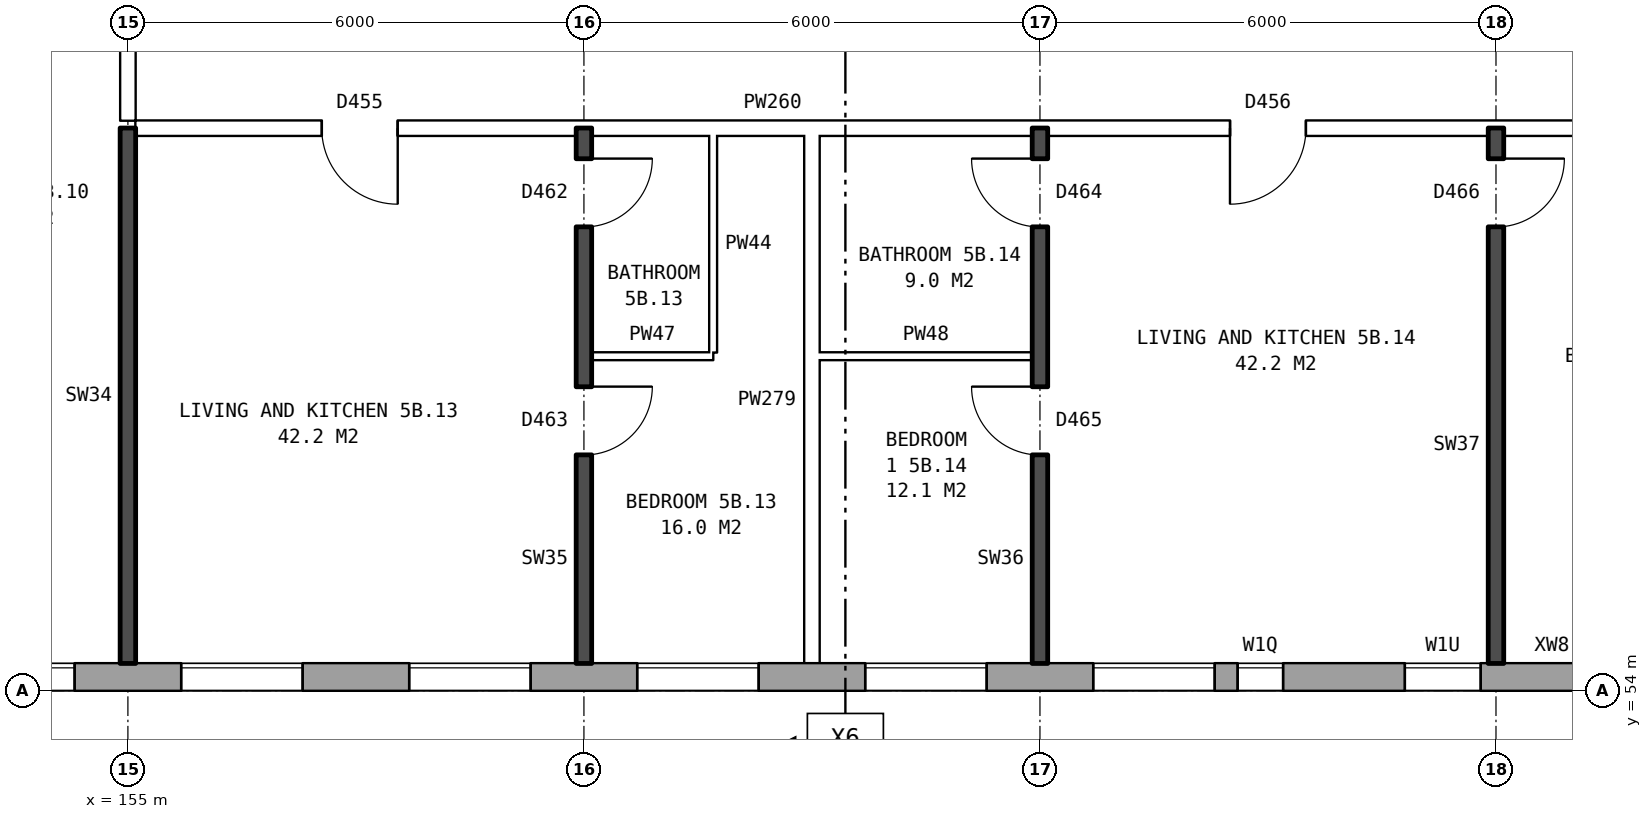
"""IFC4 building model, lengths in metres.
Left out: names, types, materials, properties, quantities, classifications, styles, units other than length and angle.
Written with IfcOpenShell. Run it as: python <this file> out.ifc"""

import sys

from ifc_helpers import new_model, si_unit, direction, frame, frame_2d, origin, place, context, subcontext, project, spatial, rectangle, extrude, element, fill, save


model = new_model("IFC4")
c1 = context("Model", 3, precision=1e-05, world=origin(), true_north=direction((0.0, 1.0)))
c2 = subcontext(c1, "Body", "Model", "MODEL_VIEW")
j1 = project(units=[si_unit("LENGTHUNIT", "METRE"), si_unit("PLANEANGLEUNIT", "RADIAN")], contexts=[c1])
p1 = place(None, origin())
s1 = spatial("IfcSite", under=j1, at=p1, CompositionType="ELEMENT")
p2 = place(p1, origin())
s2 = spatial("IfcBuilding", under=s1, at=p2, CompositionType="ELEMENT")
p3 = place(p2, frame((0.0, 0.0, 22.6)))
s3 = spatial("IfcBuildingStorey", under=s2, at=p3, CompositionType="ELEMENT", Elevation=22.6)
p4 = place(p3, frame((134.075, 54.18, 0.0), z_axis=(0.0, 0.0, 1.0), x_axis=(1.0, 0.0, 0.0)))
e1 = element("IfcWall", 1, at=p4, inside=s3, PredefinedType="STANDARD", context=c2, shape_type="SweptSolid", body=[
    extrude(rectangle(XDim=40.601, YDim=0.36, at=frame_2d((20.3, 0.0))), origin(), (0.0, 0.0, 1.0), 2.85),
])
p5 = place(p4, frame((0.3, 0.0, 0.8)))
e2 = element("IfcOpeningElement", 2, at=p5, cuts=e1, PredefinedType="OPENING", context=c2, shape_type="SweptSolid", body=[
    extrude(rectangle(XDim=1.4, YDim=1.8, at=frame_2d((0.7, 0.9))), frame((0.0, 0.19, 0.0), z_axis=(0.0, -1.0, 0.0), x_axis=(1.0, 0.0, 0.0)), (0.0, 0.0, 1.0), 0.38),
])
p6 = place(p4, frame((4.125, 0.0, 0.8)))
e3 = element("IfcOpeningElement", 3, at=p6, cuts=e1, PredefinedType="OPENING", context=c2, shape_type="SweptSolid", body=[
    extrude(rectangle(XDim=0.8, YDim=0.9, at=frame_2d((0.4, 0.45))), frame((0.0, 0.19, 0.0), z_axis=(0.0, -1.0, 0.0), x_axis=(1.0, 0.0, 0.0)), (0.0, 0.0, 1.0), 0.38),
])
p7 = place(p4, frame((6.625, 0.0, 0.8)))
e4 = element("IfcOpeningElement", 4, at=p7, cuts=e1, PredefinedType="OPENING", context=c2, shape_type="SweptSolid", body=[
    extrude(rectangle(XDim=1.6, YDim=1.8, at=frame_2d((0.8, 0.9))), frame((0.0, 0.19, 0.0), z_axis=(0.0, -1.0, 0.0), x_axis=(1.0, 0.0, 0.0)), (0.0, 0.0, 1.0), 0.38),
])
p8 = place(p4, frame((9.625, 0.0, 0.8)))
e5 = element("IfcOpeningElement", 5, at=p8, cuts=e1, PredefinedType="OPENING", context=c2, shape_type="SweptSolid", body=[
    extrude(rectangle(XDim=1.6, YDim=1.8, at=frame_2d((0.8, 0.9))), frame((0.0, 0.19, 0.0), z_axis=(0.0, -1.0, 0.0), x_axis=(1.0, 0.0, 0.0)), (0.0, 0.0, 1.0), 0.38),
])
p9 = place(p4, frame((12.625, 0.0, 0.8)))
e6 = element("IfcOpeningElement", 6, at=p9, cuts=e1, PredefinedType="OPENING", context=c2, shape_type="SweptSolid", body=[
    extrude(rectangle(XDim=1.6, YDim=1.8, at=frame_2d((0.8, 0.9))), frame((0.0, 0.19, 0.0), z_axis=(0.0, -1.0, 0.0), x_axis=(1.0, 0.0, 0.0)), (0.0, 0.0, 1.0), 0.38),
])
p10 = place(p4, frame((15.625, 0.0, 0.8)))
e7 = element("IfcOpeningElement", 7, at=p10, cuts=e1, PredefinedType="OPENING", context=c2, shape_type="SweptSolid", body=[
    extrude(rectangle(XDim=1.6, YDim=1.8, at=frame_2d((0.8, 0.9))), frame((0.0, 0.19, 0.0), z_axis=(0.0, -1.0, 0.0), x_axis=(1.0, 0.0, 0.0)), (0.0, 0.0, 1.0), 0.38),
])
p11 = place(p4, frame((18.625, 0.0, 0.8)))
e8 = element("IfcOpeningElement", 8, at=p11, cuts=e1, PredefinedType="OPENING", context=c2, shape_type="SweptSolid", body=[
    extrude(rectangle(XDim=1.6, YDim=1.8, at=frame_2d((0.8, 0.9))), frame((0.0, 0.19, 0.0), z_axis=(0.0, -1.0, 0.0), x_axis=(1.0, 0.0, 0.0)), (0.0, 0.0, 1.0), 0.38),
])
p12 = place(p4, frame((21.625, 0.0, 0.8)))
e9 = element("IfcOpeningElement", 9, at=p12, cuts=e1, PredefinedType="OPENING", context=c2, shape_type="SweptSolid", body=[
    extrude(rectangle(XDim=1.6, YDim=1.8, at=frame_2d((0.8, 0.9))), frame((0.0, 0.19, 0.0), z_axis=(0.0, -1.0, 0.0), x_axis=(1.0, 0.0, 0.0)), (0.0, 0.0, 1.0), 0.38),
])
p13 = place(p4, frame((24.625, 0.0, 0.8)))
e10 = element("IfcOpeningElement", 10, at=p13, cuts=e1, PredefinedType="OPENING", context=c2, shape_type="SweptSolid", body=[
    extrude(rectangle(XDim=1.6, YDim=1.8, at=frame_2d((0.8, 0.9))), frame((0.0, 0.19, 0.0), z_axis=(0.0, -1.0, 0.0), x_axis=(1.0, 0.0, 0.0)), (0.0, 0.0, 1.0), 0.38),
])
p14 = place(p4, frame((27.625, 0.0, 0.8)))
e11 = element("IfcOpeningElement", 11, at=p14, cuts=e1, PredefinedType="OPENING", context=c2, shape_type="SweptSolid", body=[
    extrude(rectangle(XDim=1.6, YDim=1.8, at=frame_2d((0.8, 0.9))), frame((0.0, 0.19, 0.0), z_axis=(0.0, -1.0, 0.0), x_axis=(1.0, 0.0, 0.0)), (0.0, 0.0, 1.0), 0.38),
])
p15 = place(p4, frame((30.625, 0.0, 0.8)))
e12 = element("IfcOpeningElement", 12, at=p15, cuts=e1, PredefinedType="OPENING", context=c2, shape_type="SweptSolid", body=[
    extrude(rectangle(XDim=1.6, YDim=1.8, at=frame_2d((0.8, 0.9))), frame((0.0, 0.19, 0.0), z_axis=(0.0, -1.0, 0.0), x_axis=(1.0, 0.0, 0.0)), (0.0, 0.0, 1.0), 0.38),
])
p16 = place(p4, frame((33.625, 0.0, 0.8)))
e13 = element("IfcOpeningElement", 13, at=p16, cuts=e1, PredefinedType="OPENING", context=c2, shape_type="SweptSolid", body=[
    extrude(rectangle(XDim=1.6, YDim=1.8, at=frame_2d((0.8, 0.9))), frame((0.0, 0.19, 0.0), z_axis=(0.0, -1.0, 0.0), x_axis=(1.0, 0.0, 0.0)), (0.0, 0.0, 1.0), 0.38),
])
p17 = place(p4, frame((35.525, 0.0, 0.8)))
e14 = element("IfcOpeningElement", 14, at=p17, cuts=e1, PredefinedType="OPENING", context=c2, shape_type="SweptSolid", body=[
    extrude(rectangle(XDim=0.6, YDim=1.2, at=frame_2d((0.3, 0.6))), frame((0.0, 0.19, 0.0), z_axis=(0.0, -1.0, 0.0), x_axis=(1.0, 0.0, 0.0)), (0.0, 0.0, 1.0), 0.38),
])
p18 = place(p4, frame((2.0, 0.0, 1.5)))
e15 = element("IfcOpeningElement", 15, at=p18, cuts=e1, PredefinedType="OPENING", context=c2, shape_type="SweptSolid", body=[
    extrude(rectangle(XDim=0.6, YDim=0.9, at=frame_2d((0.3, 0.45))), frame((0.0, 0.19, 0.0), z_axis=(0.0, -1.0, 0.0), x_axis=(1.0, 0.0, 0.0)), (0.0, 0.0, 1.0), 0.38),
])
p19 = place(p4, frame((5.225, 0.0, 0.8)))
e16 = element("IfcOpeningElement", 16, at=p19, cuts=e1, PredefinedType="OPENING", context=c2, shape_type="SweptSolid", body=[
    extrude(rectangle(XDim=1.0, YDim=1.8, at=frame_2d((0.5, 0.9))), frame((0.0, 0.19, 0.0), z_axis=(0.0, -1.0, 0.0), x_axis=(1.0, 0.0, 0.0)), (0.0, 0.0, 1.0), 0.38),
])
p20 = place(p4, frame((37.725, 0.0, 1.7)))
e17 = element("IfcOpeningElement", 17, at=p20, cuts=e1, PredefinedType="OPENING", context=c2, shape_type="SweptSolid", body=[
    extrude(rectangle(XDim=1.0, YDim=0.9, at=frame_2d((0.5, 0.45))), frame((0.0, 0.19, 0.0), z_axis=(0.0, -1.0, 0.0), x_axis=(1.0, 0.0, 0.0)), (0.0, 0.0, 1.0), 0.38),
])
p21 = place(p3, frame((161.1, 58.4, 0.0), z_axis=(0.0, 0.0, 1.0), x_axis=(1.0, 0.0, 0.0)))
e18 = element("IfcWall", 18, at=p21, inside=s3, PredefinedType="PARTITIONING", context=c2, shape_type="SweptSolid", body=[
    extrude(rectangle(XDim=1.6, YDim=0.1, at=frame_2d((0.8, 0.0))), origin(), (0.0, 0.0, 1.0), 2.85),
])
p22 = place(p3, frame((164.1, 58.4, 0.0), z_axis=(0.0, 0.0, 1.0), x_axis=(1.0, 0.0, 0.0)))
e19 = element("IfcWall", 19, at=p22, inside=s3, PredefinedType="PARTITIONING", context=c2, shape_type="SweptSolid", body=[
    extrude(rectangle(XDim=2.8, YDim=0.1, at=frame_2d((1.4, 0.0))), origin(), (0.0, 0.0, 1.0), 2.85),
])
p23 = place(p3, frame((155.1, 61.4, 0.0), z_axis=(0.0, 0.0, 1.0), x_axis=(1.0, 0.0, 0.0)))
e20 = element("IfcWall", 20, at=p23, inside=s3, PredefinedType="PARTITIONING", context=c2, shape_type="SweptSolid", body=[
    extrude(rectangle(XDim=22.29, YDim=0.2, at=frame_2d((11.145, 0.0))), origin(), (0.0, 0.0, 1.0), 2.85),
])
p24 = place(p23, frame((2.45, 0.0, 0.0)))
e21 = element("IfcOpeningElement", 21, at=p24, cuts=e20, PredefinedType="OPENING", context=c2, shape_type="SweptSolid", body=[
    extrude(rectangle(XDim=1.0, YDim=2.1, at=frame_2d((0.5, 1.05))), frame((0.0, 0.11, 0.0), z_axis=(0.0, -1.0, 0.0), x_axis=(1.0, 0.0, 0.0)), (0.0, 0.0, 1.0), 0.22),
])
p25 = place(p23, frame((14.4, 0.0, 0.0)))
e22 = element("IfcOpeningElement", 22, at=p25, cuts=e20, PredefinedType="OPENING", context=c2, shape_type="SweptSolid", body=[
    extrude(rectangle(XDim=1.0, YDim=2.1, at=frame_2d((0.5, 1.05))), frame((0.0, 0.11, 0.0), z_axis=(0.0, -1.0, 0.0), x_axis=(1.0, 0.0, 0.0)), (0.0, 0.0, 1.0), 0.22),
])
p26 = place(p3, frame((155.0, 54.36, 0.0), z_axis=(0.0, 0.0, 1.0), x_axis=(0.0, 1.0, 0.0)))
e23 = element("IfcWall", 23, at=p26, inside=s3, PredefinedType="SOLIDWALL", context=c2, shape_type="SweptSolid", body=[
    extrude(rectangle(XDim=7.04, YDim=0.2, at=frame_2d((3.52, 0.0))), origin(), (0.0, 0.0, 1.0), 2.85),
])
p27 = place(p3, frame((155.0, 61.5, 0.0), z_axis=(0.0, 0.0, 1.0), x_axis=(0.0, 1.0, 0.0)))
e24 = element("IfcWall", 24, at=p27, inside=s3, PredefinedType="PARTITIONING", context=c2, shape_type="SweptSolid", body=[
    extrude(rectangle(XDim=2.2, YDim=0.2, at=frame_2d((1.1, 0.0))), origin(), (0.0, 0.0, 1.0), 2.85),
])
p28 = place(p3, frame((161.0, 54.36, 0.0), z_axis=(0.0, 0.0, 1.0), x_axis=(0.0, 1.0, 0.0)))
e25 = element("IfcWall", 25, at=p28, inside=s3, PredefinedType="SOLIDWALL", context=c2, shape_type="SweptSolid", body=[
    extrude(rectangle(XDim=7.04, YDim=0.2, at=frame_2d((3.52, 0.0))), origin(), (0.0, 0.0, 1.0), 2.85),
])
p29 = place(p28, frame((2.74, 0.0, 0.0)))
e26 = element("IfcOpeningElement", 26, at=p29, cuts=e25, PredefinedType="OPENING", context=c2, shape_type="SweptSolid", body=[
    extrude(rectangle(XDim=0.9, YDim=2.1, at=frame_2d((0.45, 1.05))), frame((0.0, 0.11, 0.0), z_axis=(0.0, -1.0, 0.0), x_axis=(1.0, 0.0, 0.0)), (0.0, 0.0, 1.0), 0.22),
])
p30 = place(p28, frame((5.74, 0.0, 0.0)))
e27 = element("IfcOpeningElement", 27, at=p30, cuts=e25, PredefinedType="OPENING", context=c2, shape_type="SweptSolid", body=[
    extrude(rectangle(XDim=0.9, YDim=2.1, at=frame_2d((0.45, 1.05))), frame((0.0, 0.11, 0.0), z_axis=(0.0, -1.0, 0.0), x_axis=(1.0, 0.0, 0.0)), (0.0, 0.0, 1.0), 0.22),
])
p31 = place(p3, frame((162.7, 58.45, 0.0), z_axis=(0.0, 0.0, 1.0), x_axis=(0.0, 1.0, 0.0)))
e28 = element("IfcWall", 28, at=p31, inside=s3, PredefinedType="PARTITIONING", context=c2, shape_type="SweptSolid", body=[
    extrude(rectangle(XDim=2.85, YDim=0.1, at=frame_2d((1.425, 0.0))), origin(), (0.0, 0.0, 1.0), 2.85),
])
p32 = place(p3, frame((164.0, 54.36, 0.0), z_axis=(0.0, 0.0, 1.0), x_axis=(0.0, 1.0, 0.0)))
e29 = element("IfcWall", 29, at=p32, inside=s3, PredefinedType="PARTITIONING", context=c2, shape_type="SweptSolid", body=[
    extrude(rectangle(XDim=6.94, YDim=0.2, at=frame_2d((3.47, 0.0))), origin(), (0.0, 0.0, 1.0), 2.85),
])
p33 = place(p3, frame((167.0, 54.36, 0.0), z_axis=(0.0, 0.0, 1.0), x_axis=(0.0, 1.0, 0.0)))
e30 = element("IfcWall", 30, at=p33, inside=s3, PredefinedType="SOLIDWALL", context=c2, shape_type="SweptSolid", body=[
    extrude(rectangle(XDim=7.04, YDim=0.2, at=frame_2d((3.52, 0.0))), origin(), (0.0, 0.0, 1.0), 2.85),
])
p34 = place(p33, frame((2.74, 0.0, 0.0)))
e31 = element("IfcOpeningElement", 31, at=p34, cuts=e30, PredefinedType="OPENING", context=c2, shape_type="SweptSolid", body=[
    extrude(rectangle(XDim=0.9, YDim=2.1, at=frame_2d((0.45, 1.05))), frame((0.0, 0.11, 0.0), z_axis=(0.0, -1.0, 0.0), x_axis=(1.0, 0.0, 0.0)), (0.0, 0.0, 1.0), 0.22),
])
p35 = place(p33, frame((5.74, 0.0, 0.0)))
e32 = element("IfcOpeningElement", 32, at=p35, cuts=e30, PredefinedType="OPENING", context=c2, shape_type="SweptSolid", body=[
    extrude(rectangle(XDim=0.9, YDim=2.1, at=frame_2d((0.45, 1.05))), frame((0.0, 0.11, 0.0), z_axis=(0.0, -1.0, 0.0), x_axis=(1.0, 0.0, 0.0)), (0.0, 0.0, 1.0), 0.22),
])
p36 = place(p3, frame((173.0, 54.36, 0.0), z_axis=(0.0, 0.0, 1.0), x_axis=(0.0, 1.0, 0.0)))
e33 = element("IfcWall", 33, at=p36, inside=s3, PredefinedType="SOLIDWALL", context=c2, shape_type="SweptSolid", body=[
    extrude(rectangle(XDim=7.04, YDim=0.2, at=frame_2d((3.52, 0.0))), origin(), (0.0, 0.0, 1.0), 2.85),
])
p37 = place(p36, frame((5.74, 0.0, 0.0)))
e34 = element("IfcOpeningElement", 34, at=p37, cuts=e33, PredefinedType="OPENING", context=c2, shape_type="SweptSolid", body=[
    extrude(rectangle(XDim=0.9, YDim=2.1, at=frame_2d((0.45, 1.05))), frame((0.0, 0.11, 0.0), z_axis=(0.0, -1.0, 0.0), x_axis=(1.0, 0.0, 0.0)), (0.0, 0.0, 1.0), 0.22),
])
p38 = place(p11, origin())
e35 = element("IfcWindow", 35, at=p38, inside=s3, PartitioningType="SINGLE_PANEL", PredefinedType="WINDOW", context=c2, shape_type="SweptSolid", body=[
    extrude(rectangle(XDim=1.6, YDim=1.8, at=frame_2d((0.8, 0.9))), frame((0.0, 0.15, 0.0), z_axis=(0.0, -1.0, 0.0), x_axis=(1.0, 0.0, 0.0)), (0.0, 0.0, 1.0), 0.06),
])
fill(e8, e35)
p39 = place(p12, origin())
e36 = element("IfcWindow", 36, at=p39, inside=s3, PartitioningType="SINGLE_PANEL", PredefinedType="WINDOW", context=c2, shape_type="SweptSolid", body=[
    extrude(rectangle(XDim=1.6, YDim=1.8, at=frame_2d((0.8, 0.9))), frame((0.0, 0.15, 0.0), z_axis=(0.0, -1.0, 0.0), x_axis=(1.0, 0.0, 0.0)), (0.0, 0.0, 1.0), 0.06),
])
fill(e9, e36)
p40 = place(p13, origin())
e37 = element("IfcWindow", 37, at=p40, inside=s3, PartitioningType="SINGLE_PANEL", PredefinedType="WINDOW", context=c2, shape_type="SweptSolid", body=[
    extrude(rectangle(XDim=1.6, YDim=1.8, at=frame_2d((0.8, 0.9))), frame((0.0, 0.15, 0.0), z_axis=(0.0, -1.0, 0.0), x_axis=(1.0, 0.0, 0.0)), (0.0, 0.0, 1.0), 0.06),
])
fill(e10, e37)
p41 = place(p14, origin())
e38 = element("IfcWindow", 38, at=p41, inside=s3, PartitioningType="SINGLE_PANEL", PredefinedType="WINDOW", context=c2, shape_type="SweptSolid", body=[
    extrude(rectangle(XDim=1.6, YDim=1.8, at=frame_2d((0.8, 0.9))), frame((0.0, 0.15, 0.0), z_axis=(0.0, -1.0, 0.0), x_axis=(1.0, 0.0, 0.0)), (0.0, 0.0, 1.0), 0.06),
])
fill(e11, e38)
p42 = place(p15, origin())
e39 = element("IfcWindow", 39, at=p42, inside=s3, PartitioningType="SINGLE_PANEL", PredefinedType="WINDOW", context=c2, shape_type="SweptSolid", body=[
    extrude(rectangle(XDim=1.6, YDim=1.8, at=frame_2d((0.8, 0.9))), frame((0.0, 0.15, 0.0), z_axis=(0.0, -1.0, 0.0), x_axis=(1.0, 0.0, 0.0)), (0.0, 0.0, 1.0), 0.06),
])
fill(e12, e39)
p43 = place(p16, origin())
e40 = element("IfcWindow", 40, at=p43, inside=s3, PartitioningType="SINGLE_PANEL", PredefinedType="WINDOW", context=c2, shape_type="SweptSolid", body=[
    extrude(rectangle(XDim=1.6, YDim=1.8, at=frame_2d((0.8, 0.9))), frame((0.0, 0.15, 0.0), z_axis=(0.0, -1.0, 0.0), x_axis=(1.0, 0.0, 0.0)), (0.0, 0.0, 1.0), 0.06),
])
fill(e13, e40)
p44 = place(p17, origin())
e41 = element("IfcWindow", 41, at=p44, inside=s3, PartitioningType="SINGLE_PANEL", PredefinedType="WINDOW", context=c2, shape_type="SweptSolid", body=[
    extrude(rectangle(XDim=0.6, YDim=1.2, at=frame_2d((0.3, 0.6))), frame((0.0, 0.15, 0.0), z_axis=(0.0, -1.0, 0.0), x_axis=(1.0, 0.0, 0.0)), (0.0, 0.0, 1.0), 0.06),
])
fill(e14, e41)
p45 = place(p29, frame((0.9, 0.0, 0.0), z_axis=(0.0, 0.0, 1.0), x_axis=(-1.0, 0.0, 0.0)))
e42 = element("IfcDoor", 42, at=p45, inside=s3, OperationType="SINGLE_SWING_LEFT", PredefinedType="DOOR", context=c2, shape_type="SweptSolid", body=[
    extrude(rectangle(XDim=0.9, YDim=2.1, at=frame_2d((0.45, 1.05))), frame((0.0, 0.025, 0.0), z_axis=(0.0, -1.0, 0.0), x_axis=(1.0, 0.0, 0.0)), (0.0, 0.0, 1.0), 0.05),
])
fill(e26, e42)
p46 = place(p24, frame((1.0, 0.0, 0.0), z_axis=(0.0, 0.0, 1.0), x_axis=(-1.0, 0.0, 0.0)))
e43 = element("IfcDoor", 43, at=p46, inside=s3, OperationType="SINGLE_SWING_LEFT", PredefinedType="DOOR", context=c2, shape_type="SweptSolid", body=[
    extrude(rectangle(XDim=1.0, YDim=2.1, at=frame_2d((0.5, 1.05))), frame((0.0, 0.025, 0.0), z_axis=(0.0, -1.0, 0.0), x_axis=(1.0, 0.0, 0.0)), (0.0, 0.0, 1.0), 0.05),
])
fill(e21, e43)
p47 = place(p30, frame((0.9, 0.0, 0.0), z_axis=(0.0, 0.0, 1.0), x_axis=(-1.0, 0.0, 0.0)))
e44 = element("IfcDoor", 44, at=p47, inside=s3, OperationType="SINGLE_SWING_LEFT", PredefinedType="DOOR", context=c2, shape_type="SweptSolid", body=[
    extrude(rectangle(XDim=0.9, YDim=2.1, at=frame_2d((0.45, 1.05))), frame((0.0, 0.025, 0.0), z_axis=(0.0, -1.0, 0.0), x_axis=(1.0, 0.0, 0.0)), (0.0, 0.0, 1.0), 0.05),
])
fill(e27, e44)
p48 = place(p34, origin())
e45 = element("IfcDoor", 45, at=p48, inside=s3, OperationType="SINGLE_SWING_RIGHT", PredefinedType="DOOR", context=c2, shape_type="SweptSolid", body=[
    extrude(rectangle(XDim=0.9, YDim=2.1, at=frame_2d((0.45, 1.05))), frame((0.0, 0.025, 0.0), z_axis=(0.0, -1.0, 0.0), x_axis=(1.0, 0.0, 0.0)), (0.0, 0.0, 1.0), 0.05),
])
fill(e31, e45)
p49 = place(p37, frame((0.9, 0.0, 0.0), z_axis=(0.0, 0.0, 1.0), x_axis=(-1.0, 0.0, 0.0)))
e46 = element("IfcDoor", 46, at=p49, inside=s3, OperationType="SINGLE_SWING_LEFT", PredefinedType="DOOR", context=c2, shape_type="SweptSolid", body=[
    extrude(rectangle(XDim=0.9, YDim=2.1, at=frame_2d((0.45, 1.05))), frame((0.0, 0.025, 0.0), z_axis=(0.0, -1.0, 0.0), x_axis=(1.0, 0.0, 0.0)), (0.0, 0.0, 1.0), 0.05),
])
fill(e34, e46)
p50 = place(p25, frame((1.0, 0.0, 0.0), z_axis=(0.0, 0.0, 1.0), x_axis=(-1.0, 0.0, 0.0)))
e47 = element("IfcDoor", 47, at=p50, inside=s3, OperationType="SINGLE_SWING_RIGHT", PredefinedType="DOOR", context=c2, shape_type="SweptSolid", body=[
    extrude(rectangle(XDim=1.0, YDim=2.1, at=frame_2d((0.5, 1.05))), frame((0.0, 0.025, 0.0), z_axis=(0.0, -1.0, 0.0), x_axis=(1.0, 0.0, 0.0)), (0.0, 0.0, 1.0), 0.05),
])
fill(e22, e47)
p51 = place(p35, origin())
e48 = element("IfcDoor", 48, at=p51, inside=s3, OperationType="SINGLE_SWING_RIGHT", PredefinedType="DOOR", context=c2, shape_type="SweptSolid", body=[
    extrude(rectangle(XDim=0.9, YDim=2.1, at=frame_2d((0.45, 1.05))), frame((0.0, 0.025, 0.0), z_axis=(0.0, -1.0, 0.0), x_axis=(1.0, 0.0, 0.0)), (0.0, 0.0, 1.0), 0.05),
])
fill(e32, e48)
p52 = place(p20, origin())
e49 = element("IfcWindow", 49, at=p52, inside=s3, PartitioningType="SINGLE_PANEL", PredefinedType="WINDOW", context=c2, shape_type="SweptSolid", body=[
    extrude(rectangle(XDim=1.0, YDim=0.9, at=frame_2d((0.5, 0.45))), frame((0.0, 0.15, 0.0), z_axis=(0.0, -1.0, 0.0), x_axis=(1.0, 0.0, 0.0)), (0.0, 0.0, 1.0), 0.06),
])
fill(e17, e49)
save(model, sys.argv[1])
